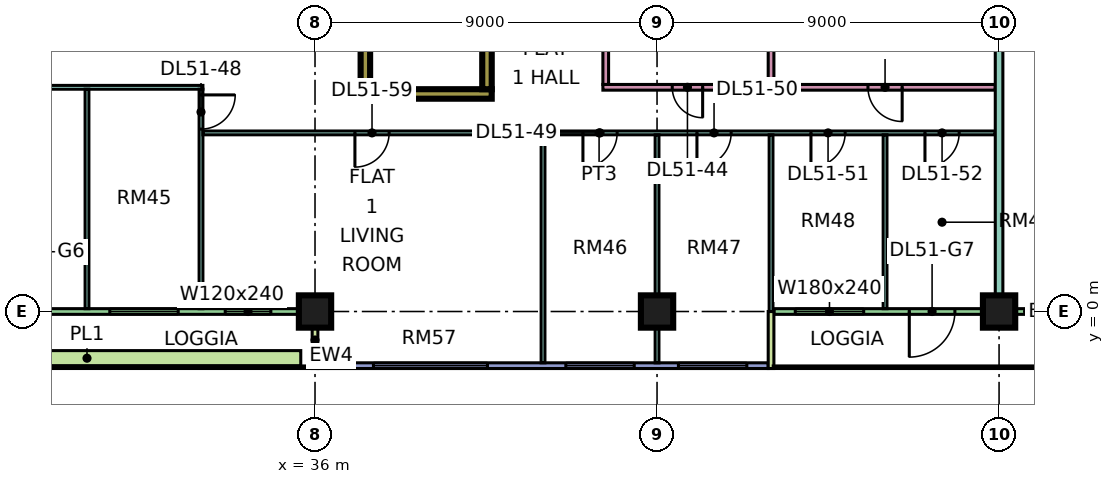
"""IFC4 building model, lengths in metres.
Left out: names, types, materials, properties, quantities, classifications, styles, units other than length and angle.
Written with IfcOpenShell. Run it as: python <this file> out.ifc"""

import sys

from ifc_helpers import new_model, si_unit, direction, frame, frame_2d, origin, origin_2d, place, context, subcontext, project, spatial, rectangle, extrude, element, fill, save


model = new_model("IFC4")
c1 = context("Model", 3, precision=1e-05, world=origin(), true_north=direction((0.0, 1.0)))
c2 = subcontext(c1, "Body", "Model", "MODEL_VIEW")
j1 = project(units=[si_unit("LENGTHUNIT", "METRE"), si_unit("PLANEANGLEUNIT", "RADIAN")], contexts=[c1])
p1 = place(None, origin())
s1 = spatial("IfcSite", under=j1, at=p1, CompositionType="ELEMENT")
p2 = place(p1, origin())
s2 = spatial("IfcBuilding", under=s1, at=p2, CompositionType="ELEMENT")
p3 = place(p2, frame((0.0, 0.0, 219.15)))
s3 = spatial("IfcBuildingStorey", under=s2, at=p3, CompositionType="ELEMENT", Elevation=219.15)
for number, where, z_axis, x_axis in (
    (1, (36.0, 0.0, 0.0), (0.0, 0.0, 1.0), (1.0, 0.0, 0.0)),
    (2, (45.0, 0.0, 0.0), (0.0, 0.0, 1.0), (1.0, 0.0, 0.0)),
    (3, (54.0, 0.0, 0.0), (0.0, 0.0, 1.0), (1.0, 0.0, 0.0)),
):
    element("IfcColumn", number, at=place(p3, frame(where, z_axis=z_axis, x_axis=x_axis)), inside=s3, PredefinedType="COLUMN", context=c2, shape_type="SweptSolid", body=[
        extrude(rectangle(XDim=0.85, YDim=0.85, at=origin_2d()), origin(), (0.0, 0.0, 1.0), 3.75),
    ])
p4 = place(p3, frame((37.2, 5.725, 0.0), z_axis=(0.0, 0.0, 1.0), x_axis=(1.0, 0.0, 0.0)))
e4 = element("IfcWall", 4, at=p4, inside=s3, PredefinedType="SHEAR", context=c2, shape_type="SweptSolid", body=[
    extrude(rectangle(XDim=3.45, YDim=0.25, at=frame_2d((1.725, 0.0))), origin(), (0.0, 0.0, 1.0), 3.75),
])
for number, where, z_axis, x_axis in (
    (5, (37.325, 5.85, 0.0), (0.0, 0.0, 1.0), (0.0, 1.0, 0.0)),
    (6, (40.525, 5.85, 0.0), (0.0, 0.0, 1.0), (0.0, 1.0, 0.0)),
):
    element("IfcWall", number, at=place(p3, frame(where, z_axis=z_axis, x_axis=x_axis)), inside=s3, PredefinedType="SHEAR", context=c2, shape_type="SweptSolid", body=[
        extrude(rectangle(XDim=6.5, YDim=0.25, at=frame_2d((3.25, 0.0))), origin(), (0.0, 0.0, 1.0), 3.75),
    ])
p5 = place(p3, frame((24.075, 0.0, 0.0), z_axis=(0.0, 0.0, 1.0), x_axis=(1.0, 0.0, 0.0)))
e7 = element("IfcWall", 7, at=p5, inside=s3, PredefinedType="SOLIDWALL", context=c2, shape_type="SweptSolid", body=[
    extrude(rectangle(XDim=11.85, YDim=0.15, at=frame_2d((5.925, 0.0))), origin(), (0.0, 0.0, 1.0), 3.35),
])
p6 = place(p5, frame((2.288, 0.0, 0.0)))
e8 = element("IfcOpeningElement", 8, at=p6, cuts=e7, PredefinedType="OPENING", context=c2, shape_type="SweptSolid", body=[
    extrude(rectangle(XDim=1.8, YDim=2.4, at=frame_2d((0.9, 1.2))), frame((0.0, 0.085, 0.0), z_axis=(0.0, -1.0, 0.0), x_axis=(1.0, 0.0, 0.0)), (0.0, 0.0, 1.0), 0.17),
])
p7 = place(p5, frame((6.525, 0.0, 0.45)))
e9 = element("IfcOpeningElement", 9, at=p7, cuts=e7, PredefinedType="OPENING", context=c2, shape_type="SweptSolid", body=[
    extrude(rectangle(XDim=1.8, YDim=2.4, at=frame_2d((0.9, 1.2))), frame((0.0, 0.085, 0.0), z_axis=(0.0, -1.0, 0.0), x_axis=(1.0, 0.0, 0.0)), (0.0, 0.0, 1.0), 0.17),
])
p8 = place(p5, frame((9.562, 0.0, 0.45)))
e10 = element("IfcOpeningElement", 10, at=p8, cuts=e7, PredefinedType="OPENING", context=c2, shape_type="SweptSolid", body=[
    extrude(rectangle(XDim=1.2, YDim=2.4, at=frame_2d((0.6, 1.2))), frame((0.0, 0.085, 0.0), z_axis=(0.0, -1.0, 0.0), x_axis=(1.0, 0.0, 0.0)), (0.0, 0.0, 1.0), 0.17),
])
p9 = place(p3, frame((36.0, -1.5, 0.0), z_axis=(0.0, 0.0, 1.0), x_axis=(0.0, 1.0, 0.0)))
e11 = element("IfcWall", 11, at=p9, inside=s3, PredefinedType="SOLIDWALL", context=c2, shape_type="SweptSolid", body=[
    extrude(rectangle(XDim=1.5, YDim=0.15, at=frame_2d((0.75, 0.0))), origin(), (0.0, 0.0, 1.0), 3.35),
])
p10 = place(p3, frame((36.075, -1.425, 0.0), z_axis=(0.0, 0.0, 1.0), x_axis=(1.0, 0.0, 0.0)))
e12 = element("IfcWall", 12, at=p10, inside=s3, PredefinedType="SOLIDWALL", context=c2, shape_type="SweptSolid", body=[
    extrude(rectangle(XDim=11.85, YDim=0.15, at=frame_2d((5.925, 0.0))), origin(), (0.0, 0.0, 1.0), 3.35),
])
p11 = place(p10, frame((1.462, 0.0, 0.45)))
e13 = element("IfcOpeningElement", 13, at=p11, cuts=e12, PredefinedType="OPENING", context=c2, shape_type="SweptSolid", body=[
    extrude(rectangle(XDim=3.0, YDim=2.4, at=frame_2d((1.5, 1.2))), frame((0.0, 0.085, 0.0), z_axis=(0.0, -1.0, 0.0), x_axis=(1.0, 0.0, 0.0)), (0.0, 0.0, 1.0), 0.17),
])
p12 = place(p10, frame((6.525, 0.0, 0.45)))
e14 = element("IfcOpeningElement", 14, at=p12, cuts=e12, PredefinedType="OPENING", context=c2, shape_type="SweptSolid", body=[
    extrude(rectangle(XDim=1.8, YDim=2.4, at=frame_2d((0.9, 1.2))), frame((0.0, 0.085, 0.0), z_axis=(0.0, -1.0, 0.0), x_axis=(1.0, 0.0, 0.0)), (0.0, 0.0, 1.0), 0.17),
])
p13 = place(p10, frame((9.488, 0.0, 0.45)))
e15 = element("IfcOpeningElement", 15, at=p13, cuts=e12, PredefinedType="OPENING", context=c2, shape_type="SweptSolid", body=[
    extrude(rectangle(XDim=1.8, YDim=2.4, at=frame_2d((0.9, 1.2))), frame((0.0, 0.085, 0.0), z_axis=(0.0, -1.0, 0.0), x_axis=(1.0, 0.0, 0.0)), (0.0, 0.0, 1.0), 0.17),
])
p14 = place(p3, frame((48.075, 0.0, 0.0), z_axis=(0.0, 0.0, 1.0), x_axis=(1.0, 0.0, 0.0)))
e16 = element("IfcWall", 16, at=p14, inside=s3, PredefinedType="SOLIDWALL", context=c2, shape_type="SweptSolid", body=[
    extrude(rectangle(XDim=13.35, YDim=0.15, at=frame_2d((6.675, 0.0))), origin(), (0.0, 0.0, 1.0), 3.35),
])
p15 = place(p14, frame((0.562, 0.0, 0.45)))
e17 = element("IfcOpeningElement", 17, at=p15, cuts=e16, PredefinedType="OPENING", context=c2, shape_type="SweptSolid", body=[
    extrude(rectangle(XDim=1.8, YDim=2.4, at=frame_2d((0.9, 1.2))), frame((0.0, 0.085, 0.0), z_axis=(0.0, -1.0, 0.0), x_axis=(1.0, 0.0, 0.0)), (0.0, 0.0, 1.0), 0.17),
])
p16 = place(p14, frame((3.562, 0.0, 0.0)))
e18 = element("IfcOpeningElement", 18, at=p16, cuts=e16, PredefinedType="OPENING", context=c2, shape_type="SweptSolid", body=[
    extrude(rectangle(XDim=1.2, YDim=2.4, at=frame_2d((0.6, 1.2))), frame((0.0, 0.085, 0.0), z_axis=(0.0, -1.0, 0.0), x_axis=(1.0, 0.0, 0.0)), (0.0, 0.0, 1.0), 0.17),
])
p17 = place(p14, frame((7.087, 0.0, 0.45)))
e19 = element("IfcOpeningElement", 19, at=p17, cuts=e16, PredefinedType="OPENING", context=c2, shape_type="SweptSolid", body=[
    extrude(rectangle(XDim=1.2, YDim=2.4, at=frame_2d((0.6, 1.2))), frame((0.0, 0.085, 0.0), z_axis=(0.0, -1.0, 0.0), x_axis=(1.0, 0.0, 0.0)), (0.0, 0.0, 1.0), 0.17),
])
p18 = place(p14, frame((9.525, 0.0, 0.45)))
e20 = element("IfcOpeningElement", 20, at=p18, cuts=e16, PredefinedType="OPENING", context=c2, shape_type="SweptSolid", body=[
    extrude(rectangle(XDim=1.8, YDim=2.4, at=frame_2d((0.9, 1.2))), frame((0.0, 0.085, 0.0), z_axis=(0.0, -1.0, 0.0), x_axis=(1.0, 0.0, 0.0)), (0.0, 0.0, 1.0), 0.17),
])
p19 = place(p14, frame((12.188, 0.0, 0.45)))
e21 = element("IfcOpeningElement", 21, at=p19, cuts=e16, PredefinedType="OPENING", context=c2, shape_type="SweptSolid", body=[
    extrude(rectangle(XDim=0.9, YDim=2.4, at=frame_2d((0.45, 1.2))), frame((0.0, 0.085, 0.0), z_axis=(0.0, -1.0, 0.0), x_axis=(1.0, 0.0, 0.0)), (0.0, 0.0, 1.0), 0.17),
])
p20 = place(p3, frame((48.0, -1.5, 0.0), z_axis=(0.0, 0.0, 1.0), x_axis=(0.0, 1.0, 0.0)))
e22 = element("IfcWall", 22, at=p20, inside=s3, PredefinedType="SOLIDWALL", context=c2, shape_type="SweptSolid", body=[
    extrude(rectangle(XDim=1.5, YDim=0.15, at=frame_2d((0.75, 0.0))), origin(), (0.0, 0.0, 1.0), 3.35),
])
p21 = place(p3, frame((24.375, -1.229, 0.0), z_axis=(0.0, 0.0, 1.0), x_axis=(1.0, 0.0, 0.0)))
e23 = element("IfcWall", 23, at=p21, inside=s3, PredefinedType="SOLIDWALL", context=c2, shape_type="SweptSolid", body=[
    extrude(rectangle(XDim=11.25, YDim=0.4, at=frame_2d((5.625, 0.0))), origin(), (0.0, 0.0, 1.0), 0.7),
])
p22 = place(p3, frame((11.95, 5.9, 0.0), z_axis=(0.0, 0.0, 1.0), x_axis=(1.0, 0.0, 0.0)))
e24 = element("IfcWall", 24, at=p22, inside=s3, PredefinedType="PARTITIONING", context=c2, shape_type="SweptSolid", body=[
    extrude(rectangle(XDim=21.1, YDim=0.1, at=frame_2d((10.55, 0.0))), origin(), (0.0, 0.0, 1.0), 3.35),
])
p23 = place(p22, frame((1.1, 0.0, 0.0)))
e25 = element("IfcOpeningElement", 25, at=p23, cuts=e24, PredefinedType="OPENING", context=c2, shape_type="SweptSolid", body=[
    extrude(rectangle(XDim=0.9, YDim=2.1, at=frame_2d((0.45, 1.05))), frame((0.0, 0.06, 0.0), z_axis=(0.0, -1.0, 0.0), x_axis=(1.0, 0.0, 0.0)), (0.0, 0.0, 1.0), 0.12),
])
p24 = place(p22, frame((4.1, 0.0, 0.0)))
e26 = element("IfcOpeningElement", 26, at=p24, cuts=e24, PredefinedType="OPENING", context=c2, shape_type="SweptSolid", body=[
    extrude(rectangle(XDim=0.9, YDim=2.1, at=frame_2d((0.45, 1.05))), frame((0.0, 0.06, 0.0), z_axis=(0.0, -1.0, 0.0), x_axis=(1.0, 0.0, 0.0)), (0.0, 0.0, 1.0), 0.12),
])
p25 = place(p22, frame((7.1, 0.0, 0.0)))
e27 = element("IfcOpeningElement", 27, at=p25, cuts=e24, PredefinedType="OPENING", context=c2, shape_type="SweptSolid", body=[
    extrude(rectangle(XDim=0.9, YDim=2.1, at=frame_2d((0.45, 1.05))), frame((0.0, 0.06, 0.0), z_axis=(0.0, -1.0, 0.0), x_axis=(1.0, 0.0, 0.0)), (0.0, 0.0, 1.0), 0.12),
])
p26 = place(p22, frame((13.1, 0.0, 0.0)))
e28 = element("IfcOpeningElement", 28, at=p26, cuts=e24, PredefinedType="OPENING", context=c2, shape_type="SweptSolid", body=[
    extrude(rectangle(XDim=0.9, YDim=2.1, at=frame_2d((0.45, 1.05))), frame((0.0, 0.06, 0.0), z_axis=(0.0, -1.0, 0.0), x_axis=(1.0, 0.0, 0.0)), (0.0, 0.0, 1.0), 0.12),
])
p27 = place(p3, frame((30.0, 0.074, 0.0), z_axis=(0.0, 0.0, 1.0), x_axis=(0.0, 1.0, 0.0)))
e29 = element("IfcWall", 29, at=p27, inside=s3, PredefinedType="PARTITIONING", context=c2, shape_type="SweptSolid", body=[
    extrude(rectangle(XDim=5.776, YDim=0.1, at=frame_2d((2.888, 0.0))), origin(), (0.0, 0.0, 1.0), 3.35),
])
p28 = place(p3, frame((33.0, 0.074, 0.0), z_axis=(0.0, 0.0, 1.0), x_axis=(0.0, 1.0, 0.0)))
e30 = element("IfcWall", 30, at=p28, inside=s3, PredefinedType="PARTITIONING", context=c2, shape_type="SweptSolid", body=[
    extrude(rectangle(XDim=5.776, YDim=0.1, at=frame_2d((2.888, 0.0))), origin(), (0.0, 0.0, 1.0), 3.35),
])
p29 = place(p28, frame((4.726, 0.0, 0.0)))
e31 = element("IfcOpeningElement", 31, at=p29, cuts=e30, PredefinedType="OPENING", context=c2, shape_type="SweptSolid", body=[
    extrude(rectangle(XDim=0.9, YDim=2.1, at=frame_2d((0.45, 1.05))), frame((0.0, 0.06, 0.0), z_axis=(0.0, -1.0, 0.0), x_axis=(1.0, 0.0, 0.0)), (0.0, 0.0, 1.0), 0.12),
])
p30 = place(p3, frame((33.05, 4.7, 0.0), z_axis=(0.0, 0.0, 1.0), x_axis=(1.0, 0.0, 0.0)))
e32 = element("IfcWall", 32, at=p30, inside=s3, PredefinedType="PARTITIONING", context=c2, shape_type="SweptSolid", body=[
    extrude(rectangle(XDim=20.85, YDim=0.1, at=frame_2d((10.425, 0.0))), origin(), (0.0, 0.0, 1.0), 3.35),
])
p31 = place(p30, frame((10.0, 0.0, 0.0)))
e33 = element("IfcOpeningElement", 33, at=p31, cuts=e32, PredefinedType="OPENING", context=c2, shape_type="SweptSolid", body=[
    extrude(rectangle(XDim=0.9, YDim=2.1, at=frame_2d((0.45, 1.05))), frame((0.0, 0.06, 0.0), z_axis=(0.0, -1.0, 0.0), x_axis=(1.0, 0.0, 0.0)), (0.0, 0.0, 1.0), 0.12),
])
p32 = place(p30, frame((13.0, 0.0, 0.0)))
e34 = element("IfcOpeningElement", 34, at=p32, cuts=e32, PredefinedType="OPENING", context=c2, shape_type="SweptSolid", body=[
    extrude(rectangle(XDim=0.9, YDim=2.1, at=frame_2d((0.45, 1.05))), frame((0.0, 0.06, 0.0), z_axis=(0.0, -1.0, 0.0), x_axis=(1.0, 0.0, 0.0)), (0.0, 0.0, 1.0), 0.12),
])
p33 = place(p30, frame((16.0, 0.0, 0.0)))
e35 = element("IfcOpeningElement", 35, at=p33, cuts=e32, PredefinedType="OPENING", context=c2, shape_type="SweptSolid", body=[
    extrude(rectangle(XDim=0.9, YDim=2.1, at=frame_2d((0.45, 1.05))), frame((0.0, 0.06, 0.0), z_axis=(0.0, -1.0, 0.0), x_axis=(1.0, 0.0, 0.0)), (0.0, 0.0, 1.0), 0.12),
])
p34 = place(p30, frame((19.0, 0.0, 0.0)))
e36 = element("IfcOpeningElement", 36, at=p34, cuts=e32, PredefinedType="OPENING", context=c2, shape_type="SweptSolid", body=[
    extrude(rectangle(XDim=0.9, YDim=2.1, at=frame_2d((0.45, 1.05))), frame((0.0, 0.06, 0.0), z_axis=(0.0, -1.0, 0.0), x_axis=(1.0, 0.0, 0.0)), (0.0, 0.0, 1.0), 0.12),
])
p35 = place(p30, frame((4.0, 0.0, 0.0)))
e37 = element("IfcOpeningElement", 37, at=p35, cuts=e32, PredefinedType="OPENING", context=c2, shape_type="SweptSolid", body=[
    extrude(rectangle(XDim=0.9, YDim=2.1, at=frame_2d((0.45, 1.05))), frame((0.0, 0.06, 0.0), z_axis=(0.0, -1.0, 0.0), x_axis=(1.0, 0.0, 0.0)), (0.0, 0.0, 1.0), 0.12),
])
p36 = place(p3, frame((42.0, -1.35, 0.0), z_axis=(0.0, 0.0, 1.0), x_axis=(0.0, 1.0, 0.0)))
e38 = element("IfcWall", 38, at=p36, inside=s3, PredefinedType="PARTITIONING", context=c2, shape_type="SweptSolid", body=[
    extrude(rectangle(XDim=6.0, YDim=0.1, at=frame_2d((3.0, 0.0))), origin(), (0.0, 0.0, 1.0), 3.35),
])
p37 = place(p3, frame((43.575, 5.9, 0.0), z_axis=(0.0, 0.0, 1.0), x_axis=(1.0, 0.0, 0.0)))
e39 = element("IfcWall", 39, at=p37, inside=s3, PredefinedType="PARTITIONING", context=c2, shape_type="SweptSolid", body=[
    extrude(rectangle(XDim=10.325, YDim=0.15, at=frame_2d((5.163, 0.0))), origin(), (0.0, 0.0, 1.0), 3.35),
])
p38 = place(p37, frame((1.825, 0.0, 0.0)))
e40 = element("IfcOpeningElement", 40, at=p38, cuts=e39, PredefinedType="OPENING", context=c2, shape_type="SweptSolid", body=[
    extrude(rectangle(XDim=0.8, YDim=2.1, at=frame_2d((0.4, 1.05))), frame((0.0, 0.085, 0.0), z_axis=(0.0, -1.0, 0.0), x_axis=(1.0, 0.0, 0.0)), (0.0, 0.0, 1.0), 0.17),
])
p39 = place(p37, frame((6.975, 0.0, 0.0)))
e41 = element("IfcOpeningElement", 41, at=p39, cuts=e39, PredefinedType="OPENING", context=c2, shape_type="SweptSolid", body=[
    extrude(rectangle(XDim=0.9, YDim=2.1, at=frame_2d((0.45, 1.05))), frame((0.0, 0.085, 0.0), z_axis=(0.0, -1.0, 0.0), x_axis=(1.0, 0.0, 0.0)), (0.0, 0.0, 1.0), 0.17),
])
p40 = place(p3, frame((43.65, 5.975, 0.0), z_axis=(0.0, 0.0, 1.0), x_axis=(0.0, 1.0, 0.0)))
e42 = element("IfcWall", 42, at=p40, inside=s3, PredefinedType="PARTITIONING", context=c2, shape_type="SweptSolid", body=[
    extrude(rectangle(XDim=6.35, YDim=0.15, at=frame_2d((3.175, 0.0))), origin(), (0.0, 0.0, 1.0), 3.35),
])
p41 = place(p40, frame((4.275, 0.0, 0.0)))
e43 = element("IfcOpeningElement", 43, at=p41, cuts=e42, PredefinedType="OPENING", context=c2, shape_type="SweptSolid", body=[
    extrude(rectangle(XDim=0.9, YDim=2.1, at=frame_2d((0.45, 1.05))), frame((0.0, 0.085, 0.0), z_axis=(0.0, -1.0, 0.0), x_axis=(1.0, 0.0, 0.0)), (0.0, 0.0, 1.0), 0.17),
])
p42 = place(p3, frame((45.0, -1.351, 0.0), z_axis=(0.0, 0.0, 1.0), x_axis=(0.0, 1.0, 0.0)))
e44 = element("IfcWall", 44, at=p42, inside=s3, PredefinedType="PARTITIONING", context=c2, shape_type="SweptSolid", body=[
    extrude(rectangle(XDim=6.001, YDim=0.1, at=frame_2d((3.0, 0.0))), origin(), (0.0, 0.0, 1.0), 3.35),
])
p43 = place(p3, frame((48.0, 0.0, 0.0), z_axis=(0.0, 0.0, 1.0), x_axis=(0.0, 1.0, 0.0)))
e45 = element("IfcWall", 45, at=p43, inside=s3, PredefinedType="PARTITIONING", context=c2, shape_type="SweptSolid", body=[
    extrude(rectangle(XDim=4.65, YDim=0.1, at=frame_2d((2.325, 0.0))), origin(), (0.0, 0.0, 1.0), 3.35),
])
p44 = place(p3, frame((48.0, 5.975, 0.0), z_axis=(0.0, 0.0, 1.0), x_axis=(0.0, 1.0, 0.0)))
e46 = element("IfcWall", 46, at=p44, inside=s3, PredefinedType="PARTITIONING", context=c2, shape_type="SweptSolid", body=[
    extrude(rectangle(XDim=6.35, YDim=0.15, at=frame_2d((3.175, 0.0))), origin(), (0.0, 0.0, 1.0), 3.35),
])
p45 = place(p3, frame((51.0, 0.074, 0.0), z_axis=(0.0, 0.0, 1.0), x_axis=(0.0, 1.0, 0.0)))
e47 = element("IfcWall", 47, at=p45, inside=s3, PredefinedType="PARTITIONING", context=c2, shape_type="SweptSolid", body=[
    extrude(rectangle(XDim=4.576, YDim=0.1, at=frame_2d((2.288, 0.0))), origin(), (0.0, 0.0, 1.0), 3.35),
])
p46 = place(p3, frame((54.0, 0.074, 0.0), z_axis=(0.0, 0.0, 1.0), x_axis=(0.0, 1.0, 0.0)))
e48 = element("IfcWall", 48, at=p46, inside=s3, PredefinedType="PARTITIONING", context=c2, shape_type="SweptSolid", body=[
    extrude(rectangle(XDim=12.251, YDim=0.2, at=frame_2d((6.125, 0.0))), origin(), (0.0, 0.0, 1.0), 3.35),
])
p47 = place(p7, origin())
e49 = element("IfcWindow", 49, at=p47, inside=s3, PartitioningType="SINGLE_PANEL", PredefinedType="WINDOW", context=c2, shape_type="SweptSolid", body=[
    extrude(rectangle(XDim=1.8, YDim=2.4, at=frame_2d((0.9, 1.2))), frame((0.0, 0.03, 0.0), z_axis=(0.0, -1.0, 0.0), x_axis=(1.0, 0.0, 0.0)), (0.0, 0.0, 1.0), 0.06),
])
fill(e9, e49)
p48 = place(p8, origin())
e50 = element("IfcWindow", 50, at=p48, inside=s3, PartitioningType="SINGLE_PANEL", PredefinedType="WINDOW", context=c2, shape_type="SweptSolid", body=[
    extrude(rectangle(XDim=1.2, YDim=2.4, at=frame_2d((0.6, 1.2))), frame((0.0, 0.03, 0.0), z_axis=(0.0, -1.0, 0.0), x_axis=(1.0, 0.0, 0.0)), (0.0, 0.0, 1.0), 0.06),
])
fill(e10, e50)
p49 = place(p11, origin())
e51 = element("IfcWindow", 51, at=p49, inside=s3, PartitioningType="SINGLE_PANEL", PredefinedType="WINDOW", context=c2, shape_type="SweptSolid", body=[
    extrude(rectangle(XDim=3.0, YDim=2.4, at=frame_2d((1.5, 1.2))), frame((0.0, 0.03, 0.0), z_axis=(0.0, -1.0, 0.0), x_axis=(1.0, 0.0, 0.0)), (0.0, 0.0, 1.0), 0.06),
])
fill(e13, e51)
p50 = place(p12, origin())
e52 = element("IfcWindow", 52, at=p50, inside=s3, PartitioningType="SINGLE_PANEL", PredefinedType="WINDOW", context=c2, shape_type="SweptSolid", body=[
    extrude(rectangle(XDim=1.8, YDim=2.4, at=frame_2d((0.9, 1.2))), frame((0.0, 0.03, 0.0), z_axis=(0.0, -1.0, 0.0), x_axis=(1.0, 0.0, 0.0)), (0.0, 0.0, 1.0), 0.06),
])
fill(e14, e52)
p51 = place(p13, origin())
e53 = element("IfcWindow", 53, at=p51, inside=s3, PartitioningType="SINGLE_PANEL", PredefinedType="WINDOW", context=c2, shape_type="SweptSolid", body=[
    extrude(rectangle(XDim=1.8, YDim=2.4, at=frame_2d((0.9, 1.2))), frame((0.0, 0.03, 0.0), z_axis=(0.0, -1.0, 0.0), x_axis=(1.0, 0.0, 0.0)), (0.0, 0.0, 1.0), 0.06),
])
fill(e15, e53)
p52 = place(p15, origin())
e54 = element("IfcWindow", 54, at=p52, inside=s3, PartitioningType="SINGLE_PANEL", PredefinedType="WINDOW", context=c2, shape_type="SweptSolid", body=[
    extrude(rectangle(XDim=1.8, YDim=2.4, at=frame_2d((0.9, 1.2))), frame((0.0, 0.03, 0.0), z_axis=(0.0, -1.0, 0.0), x_axis=(1.0, 0.0, 0.0)), (0.0, 0.0, 1.0), 0.06),
])
fill(e17, e54)
p53 = place(p16, frame((1.2, 0.0, 0.0), z_axis=(0.0, 0.0, 1.0), x_axis=(-1.0, 0.0, 0.0)))
e55 = element("IfcDoor", 55, at=p53, inside=s3, OperationType="DOUBLE_DOOR_SINGLE_SWING", PredefinedType="DOOR", context=c2, shape_type="SweptSolid", body=[
    extrude(rectangle(XDim=1.2, YDim=2.4, at=frame_2d((0.6, 1.2))), frame((0.0, 0.025, 0.0), z_axis=(0.0, -1.0, 0.0), x_axis=(1.0, 0.0, 0.0)), (0.0, 0.0, 1.0), 0.05),
])
fill(e18, e55)
p54 = place(p38, origin())
e56 = element("IfcDoor", 56, at=p54, inside=s3, OperationType="SINGLE_SWING_RIGHT", PredefinedType="DOOR", context=c2, shape_type="SweptSolid", body=[
    extrude(rectangle(XDim=0.8, YDim=2.1, at=frame_2d((0.4, 1.05))), frame((0.0, 0.025, 0.0), z_axis=(0.0, -1.0, 0.0), x_axis=(1.0, 0.0, 0.0)), (0.0, 0.0, 1.0), 0.05),
])
fill(e40, e56)
p55 = place(p29, origin())
e57 = element("IfcDoor", 57, at=p55, inside=s3, OperationType="SINGLE_SWING_RIGHT", PredefinedType="DOOR", context=c2, shape_type="SweptSolid", body=[
    extrude(rectangle(XDim=0.9, YDim=2.1, at=frame_2d((0.45, 1.05))), frame((0.0, 0.025, 0.0), z_axis=(0.0, -1.0, 0.0), x_axis=(1.0, 0.0, 0.0)), (0.0, 0.0, 1.0), 0.05),
])
fill(e31, e57)
p56 = place(p31, frame((0.9, 0.0, 0.0), z_axis=(0.0, 0.0, 1.0), x_axis=(-1.0, 0.0, 0.0)))
e58 = element("IfcDoor", 58, at=p56, inside=s3, OperationType="SINGLE_SWING_LEFT", PredefinedType="DOOR", context=c2, shape_type="SweptSolid", body=[
    extrude(rectangle(XDim=0.9, YDim=2.1, at=frame_2d((0.45, 1.05))), frame((0.0, 0.025, 0.0), z_axis=(0.0, -1.0, 0.0), x_axis=(1.0, 0.0, 0.0)), (0.0, 0.0, 1.0), 0.05),
])
fill(e33, e58)
p57 = place(p32, frame((0.9, 0.0, 0.0), z_axis=(0.0, 0.0, 1.0), x_axis=(-1.0, 0.0, 0.0)))
e59 = element("IfcDoor", 59, at=p57, inside=s3, OperationType="SINGLE_SWING_LEFT", PredefinedType="DOOR", context=c2, shape_type="SweptSolid", body=[
    extrude(rectangle(XDim=0.9, YDim=2.1, at=frame_2d((0.45, 1.05))), frame((0.0, 0.025, 0.0), z_axis=(0.0, -1.0, 0.0), x_axis=(1.0, 0.0, 0.0)), (0.0, 0.0, 1.0), 0.05),
])
fill(e34, e59)
p58 = place(p33, frame((0.9, 0.0, 0.0), z_axis=(0.0, 0.0, 1.0), x_axis=(-1.0, 0.0, 0.0)))
e60 = element("IfcDoor", 60, at=p58, inside=s3, OperationType="SINGLE_SWING_LEFT", PredefinedType="DOOR", context=c2, shape_type="SweptSolid", body=[
    extrude(rectangle(XDim=0.9, YDim=2.1, at=frame_2d((0.45, 1.05))), frame((0.0, 0.025, 0.0), z_axis=(0.0, -1.0, 0.0), x_axis=(1.0, 0.0, 0.0)), (0.0, 0.0, 1.0), 0.05),
])
fill(e35, e60)
p59 = place(p34, frame((0.9, 0.0, 0.0), z_axis=(0.0, 0.0, 1.0), x_axis=(-1.0, 0.0, 0.0)))
e61 = element("IfcDoor", 61, at=p59, inside=s3, OperationType="SINGLE_SWING_LEFT", PredefinedType="DOOR", context=c2, shape_type="SweptSolid", body=[
    extrude(rectangle(XDim=0.9, YDim=2.1, at=frame_2d((0.45, 1.05))), frame((0.0, 0.025, 0.0), z_axis=(0.0, -1.0, 0.0), x_axis=(1.0, 0.0, 0.0)), (0.0, 0.0, 1.0), 0.05),
])
fill(e36, e61)
p60 = place(p39, origin())
e62 = element("IfcDoor", 62, at=p60, inside=s3, OperationType="SINGLE_SWING_RIGHT", PredefinedType="DOOR", context=c2, shape_type="SweptSolid", body=[
    extrude(rectangle(XDim=0.9, YDim=2.1, at=frame_2d((0.45, 1.05))), frame((0.0, 0.025, 0.0), z_axis=(0.0, -1.0, 0.0), x_axis=(1.0, 0.0, 0.0)), (0.0, 0.0, 1.0), 0.05),
])
fill(e41, e62)
p61 = place(p35, frame((0.9, 0.0, 0.0), z_axis=(0.0, 0.0, 1.0), x_axis=(-1.0, 0.0, 0.0)))
e63 = element("IfcDoor", 63, at=p61, inside=s3, OperationType="SINGLE_SWING_LEFT", PredefinedType="DOOR", context=c2, shape_type="SweptSolid", body=[
    extrude(rectangle(XDim=0.9, YDim=2.1, at=frame_2d((0.45, 1.05))), frame((0.0, 0.025, 0.0), z_axis=(0.0, -1.0, 0.0), x_axis=(1.0, 0.0, 0.0)), (0.0, 0.0, 1.0), 0.05),
])
fill(e37, e63)
save(model, sys.argv[1])
